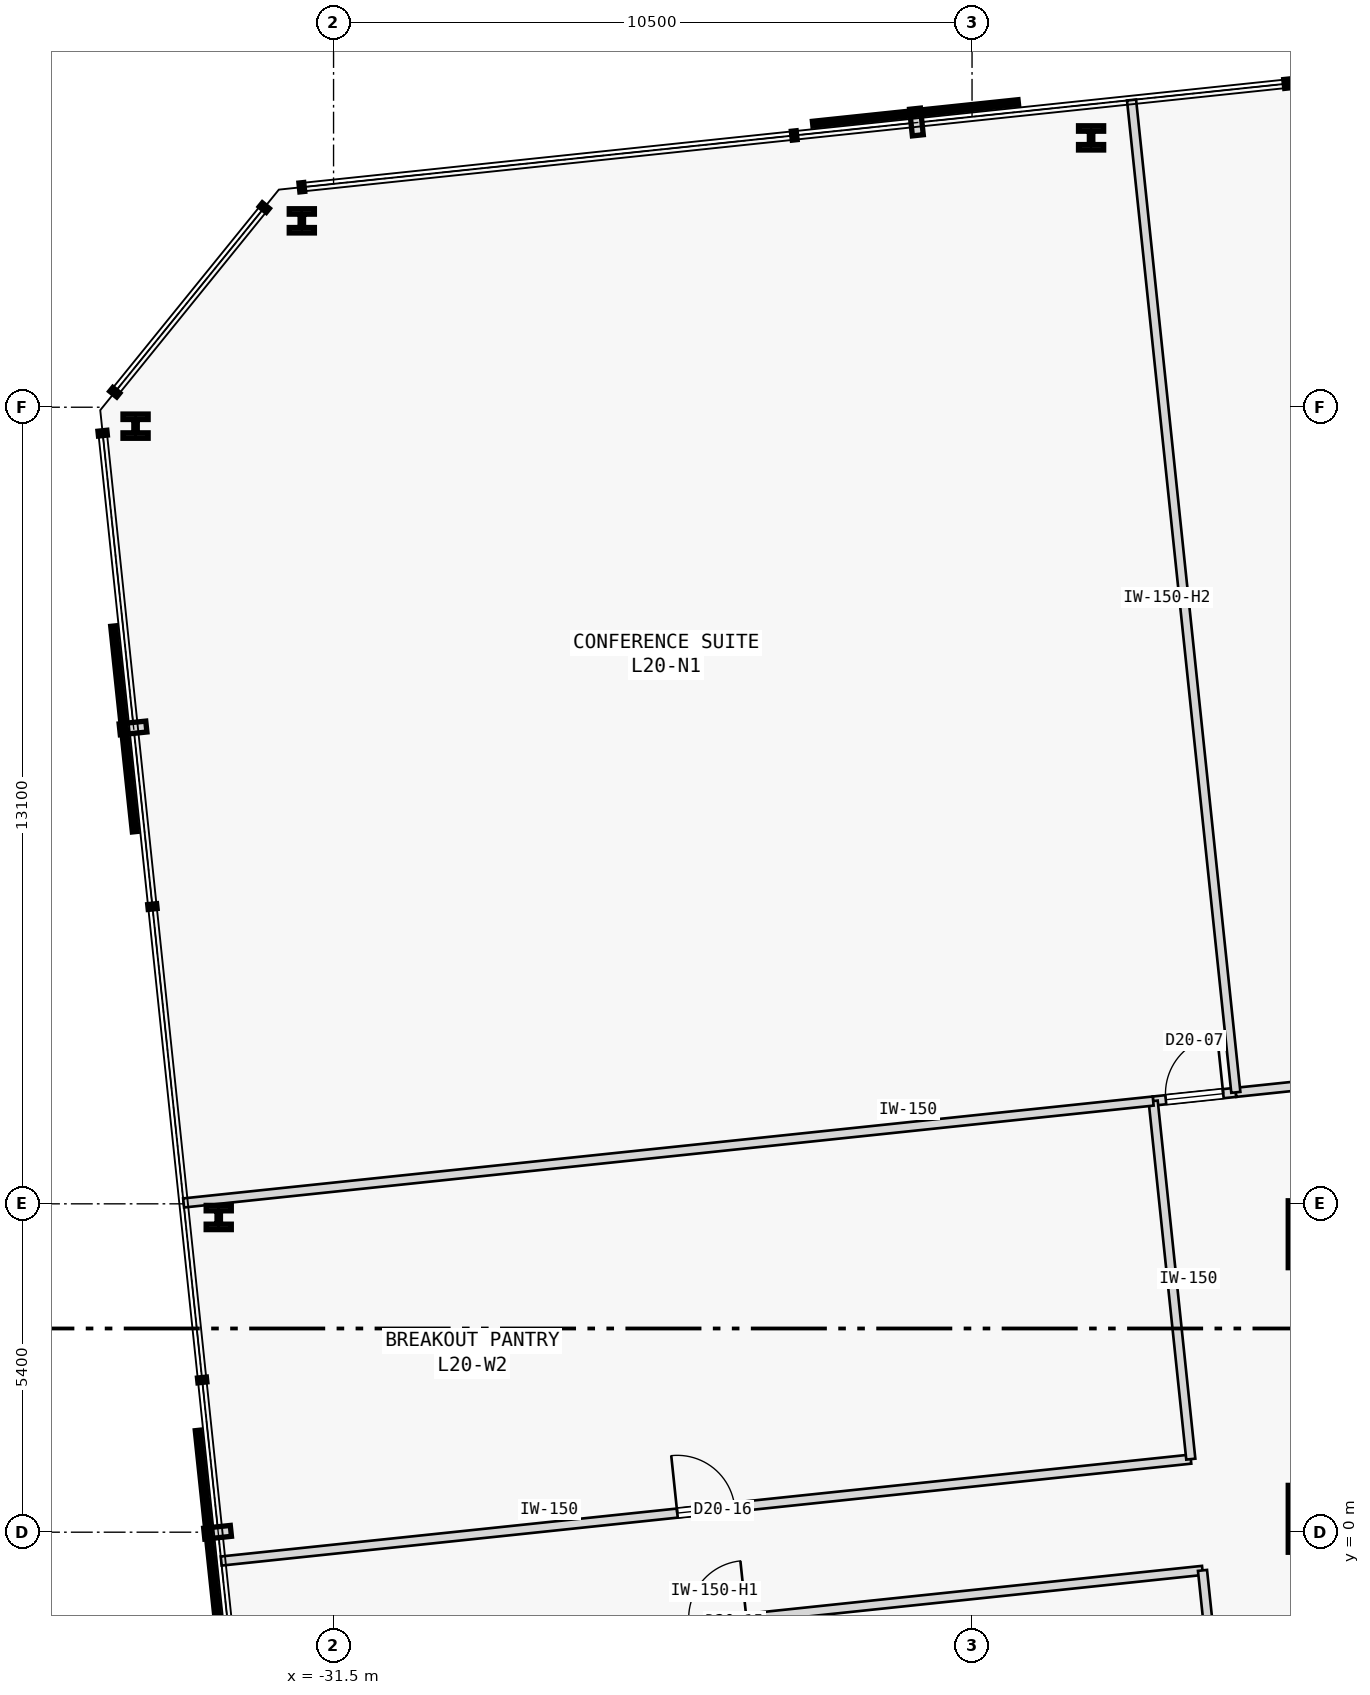
"""IFC4 building model, lengths in metres.
Left out: names, types, materials, properties, quantities, classifications, styles, units other than length and angle.
Written with IfcOpenShell. Run it as: python <this file> out.ifc"""

import sys

from ifc_helpers import new_model, si_unit, direction, frame, frame_2d, origin, origin_2d, place, context, subcontext, project, spatial, rectangle, i_section, extrude, element, fill, save


model = new_model("IFC4")
c1 = context("Model", 3, precision=1e-05, world=origin(), true_north=direction((0.0, 1.0)))
c2 = subcontext(c1, "Body", "Model", "MODEL_VIEW")
j1 = project(units=[si_unit("LENGTHUNIT", "METRE"), si_unit("PLANEANGLEUNIT", "RADIAN")], contexts=[c1])
p1 = place(None, origin())
s1 = spatial("IfcSite", under=j1, at=p1, CompositionType="ELEMENT")
p2 = place(p1, origin())
s2 = spatial("IfcBuilding", under=s1, at=p2, CompositionType="ELEMENT")
p3 = place(p2, frame((0.0, 0.0, 83.2)))
s3 = spatial("IfcBuildingStorey", under=s2, at=p3, CompositionType="ELEMENT", Elevation=83.2)
for number, where, z_axis, x_axis in (
    (1, (-15.25, 4.9, 0.0), (0.0, 0.0, 1.0), (1.0, 0.0, 0.0)),
    (2, (-15.25, 0.22, 0.0), (0.0, 0.0, 1.0), (1.0, 0.0, 0.0)),
):
    element("IfcColumn", number, at=place(p3, frame(where, z_axis=z_axis, x_axis=x_axis)), inside=s3, PredefinedType="COLUMN", context=c2, shape_type="SweptSolid", body=[
        extrude(rectangle(XDim=1.1, YDim=1.1, at=origin_2d()), origin(), (0.0, 0.0, 1.0), 4.2),
    ])
for number, where, z_axis, x_axis in (
    (3, (-19.042, 22.929, 0.0), (0.0, 0.0, 1.0), (1.0, 0.0, 0.0)),
    (4, (-32.022, 21.565, 0.0), (0.0, 0.0, 1.0), (1.0, 0.0, 0.0)),
    (5, (-34.756, 18.189, 0.0), (0.0, 0.0, 1.0), (1.0, 0.0, 0.0)),
    (6, (-33.388, 5.175, 0.0), (0.0, 0.0, 1.0), (1.0, 0.0, 0.0)),
):
    element("IfcColumn", number, at=place(p3, frame(where, z_axis=z_axis, x_axis=x_axis)), inside=s3, PredefinedType="COLUMN", context=c2, shape_type="SweptSolid", body=[
        extrude(i_section(OverallWidth=0.413, OverallDepth=0.398, WebThickness=0.056, FlangeThickness=0.089, FilletRadius=0.015, at=origin_2d()), origin(), (0.0, 0.0, 1.0), 4.2),
    ])
p4 = place(p3, frame((-18.021, 7.09, 0.0), z_axis=(0.0, 0.0, 1.0), x_axis=(0.994525986665, 0.104489529849, 0.0)))
e7 = element("IfcWall", 7, at=p4, inside=s3, PredefinedType="PARTITIONING", context=c2, shape_type="SweptSolid", body=[
    extrude(rectangle(XDim=1.367, YDim=0.15, at=frame_2d((0.684, 0.0))), origin(), (0.0, 0.0, 1.0), 3.975),
])
p5 = place(p4, frame((0.208, 0.0, 0.0)))
e8 = element("IfcOpeningElement", 8, at=p5, cuts=e7, PredefinedType="OPENING", context=c2, shape_type="SweptSolid", body=[
    extrude(rectangle(XDim=0.95, YDim=2.15, at=frame_2d((0.475, 1.075))), frame((0.0, 0.085, 0.0), z_axis=(0.0, -1.0, 0.0), x_axis=(1.0, 0.0, 0.0)), (0.0, 0.0, 1.0), 0.17),
])
p6 = place(p3, frame((-16.662, 7.233, 0.0), z_axis=(0.0, 0.0, 1.0), x_axis=(0.994521482375, 0.10453239256, 0.0)))
e9 = element("IfcWall", 9, at=p6, inside=s3, PredefinedType="PARTITIONING", context=c2, shape_type="SweptSolid", body=[
    extrude(rectangle(XDim=17.93, YDim=0.15, at=frame_2d((8.965, 0.0))), origin(), (0.0, 0.0, 1.0), 3.975),
])
p7 = place(p6, frame((8.49, 0.0, 0.0)))
e10 = element("IfcOpeningElement", 10, at=p7, cuts=e9, PredefinedType="OPENING", context=c2, shape_type="SweptSolid", body=[
    extrude(rectangle(XDim=0.95, YDim=2.15, at=frame_2d((0.475, 1.075))), frame((0.0, 0.085, 0.0), z_axis=(0.0, -1.0, 0.0), x_axis=(1.0, 0.0, 0.0)), (0.0, 0.0, 1.0), 0.17),
])
p8 = place(p3, frame((-33.155, -2.304, 0.0), z_axis=(0.0, 0.0, 1.0), x_axis=(0.994521044813, 0.104536555445, 0.0)))
e11 = element("IfcWall", 11, at=p8, inside=s3, PredefinedType="PARTITIONING", context=c2, shape_type="SweptSolid", body=[
    extrude(rectangle(XDim=16.033, YDim=0.15, at=frame_2d((8.017, 0.0))), origin(), (0.0, 0.0, 1.0), 3.525),
])
p9 = place(p8, frame((7.542, 0.0, 0.0)))
e12 = element("IfcOpeningElement", 12, at=p9, cuts=e11, PredefinedType="OPENING", context=c2, shape_type="SweptSolid", body=[
    extrude(rectangle(XDim=0.95, YDim=2.15, at=frame_2d((0.475, 1.075))), frame((0.0, 0.085, 0.0), z_axis=(0.0, -1.0, 0.0), x_axis=(1.0, 0.0, 0.0)), (0.0, 0.0, 1.0), 0.17),
])
p10 = place(p3, frame((-16.789, -4.639, 0.0), z_axis=(0.0, 0.0, 1.0), x_axis=(-0.104542983594, 0.994520369113, 0.0)))
e13 = element("IfcWall", 13, at=p10, inside=s3, PredefinedType="PARTITIONING", context=c2, shape_type="SweptSolid", body=[
    extrude(rectangle(XDim=4.033, YDim=0.15, at=frame_2d((2.017, 0.0))), origin(), (0.0, 0.0, 1.0), 3.975),
])
p11 = place(p3, frame((-33.348, -0.474, 0.0), z_axis=(0.0, 0.0, 1.0), x_axis=(0.994522794159, 0.104519911488, 0.0)))
e14 = element("IfcWall", 14, at=p11, inside=s3, PredefinedType="PARTITIONING", context=c2, shape_type="SweptSolid", body=[
    extrude(rectangle(XDim=16.033, YDim=0.15, at=frame_2d((8.017, 0.0))), origin(), (0.0, 0.0, 1.0), 3.975),
])
p12 = place(p11, frame((7.542, 0.0, 0.0)))
e15 = element("IfcOpeningElement", 15, at=p12, cuts=e14, PredefinedType="OPENING", context=c2, shape_type="SweptSolid", body=[
    extrude(rectangle(XDim=0.95, YDim=2.15, at=frame_2d((0.475, 1.075))), frame((0.0, 0.085, 0.0), z_axis=(0.0, -1.0, 0.0), x_axis=(1.0, 0.0, 0.0)), (0.0, 0.0, 1.0), 0.17),
])
p13 = place(p3, frame((-17.402, 1.202, 0.0), z_axis=(0.0, 0.0, 1.0), x_axis=(-0.104523807841, 0.994522384662, 0.0)))
e16 = element("IfcWall", 16, at=p13, inside=s3, PredefinedType="PARTITIONING", context=c2, shape_type="SweptSolid", body=[
    extrude(rectangle(XDim=5.921, YDim=0.15, at=frame_2d((2.96, 0.0))), origin(), (0.0, 0.0, 1.0), 3.975),
])
p14 = place(p3, frame((-16.662, 7.233, 0.0), z_axis=(0.0, 0.0, 1.0), x_axis=(-0.104521364336, 0.99452264147, 0.0)))
e17 = element("IfcWall", 17, at=p14, inside=s3, PredefinedType="PARTITIONING", context=c2, shape_type="SweptSolid", body=[
    extrude(rectangle(XDim=16.409, YDim=0.15, at=frame_2d((8.205, 0.0))), origin(), (0.0, 0.0, 1.0), 3.375),
])
p15 = place(p3, frame((-33.967, 5.414, 0.0), z_axis=(0.0, 0.0, 1.0), x_axis=(0.994521211213, 0.104534972363, 0.0)))
e18 = element("IfcWall", 18, at=p15, inside=s3, PredefinedType="PARTITIONING", context=c2, shape_type="SweptSolid", body=[
    extrude(rectangle(XDim=16.033, YDim=0.15, at=frame_2d((8.017, 0.0))), origin(), (0.0, 0.0, 1.0), 3.975),
])
p16 = place(p5, origin())
e19 = element("IfcDoor", 19, at=p16, inside=s3, OperationType="SINGLE_SWING_RIGHT", PredefinedType="DOOR", context=c2, shape_type="SweptSolid", body=[
    extrude(rectangle(XDim=0.95, YDim=2.15, at=frame_2d((0.475, 1.075))), frame((0.0, 0.025, 0.0), z_axis=(0.0, -1.0, 0.0), x_axis=(1.0, 0.0, 0.0)), (0.0, 0.0, 1.0), 0.05),
])
fill(e8, e19)
p17 = place(p12, origin())
e20 = element("IfcDoor", 20, at=p17, inside=s3, OperationType="SINGLE_SWING_LEFT", PredefinedType="DOOR", context=c2, shape_type="SweptSolid", body=[
    extrude(rectangle(XDim=0.95, YDim=2.15, at=frame_2d((0.475, 1.075))), frame((0.0, 0.025, 0.0), z_axis=(0.0, -1.0, 0.0), x_axis=(1.0, 0.0, 0.0)), (0.0, 0.0, 1.0), 0.05),
])
fill(e15, e20)
save(model, sys.argv[1])
